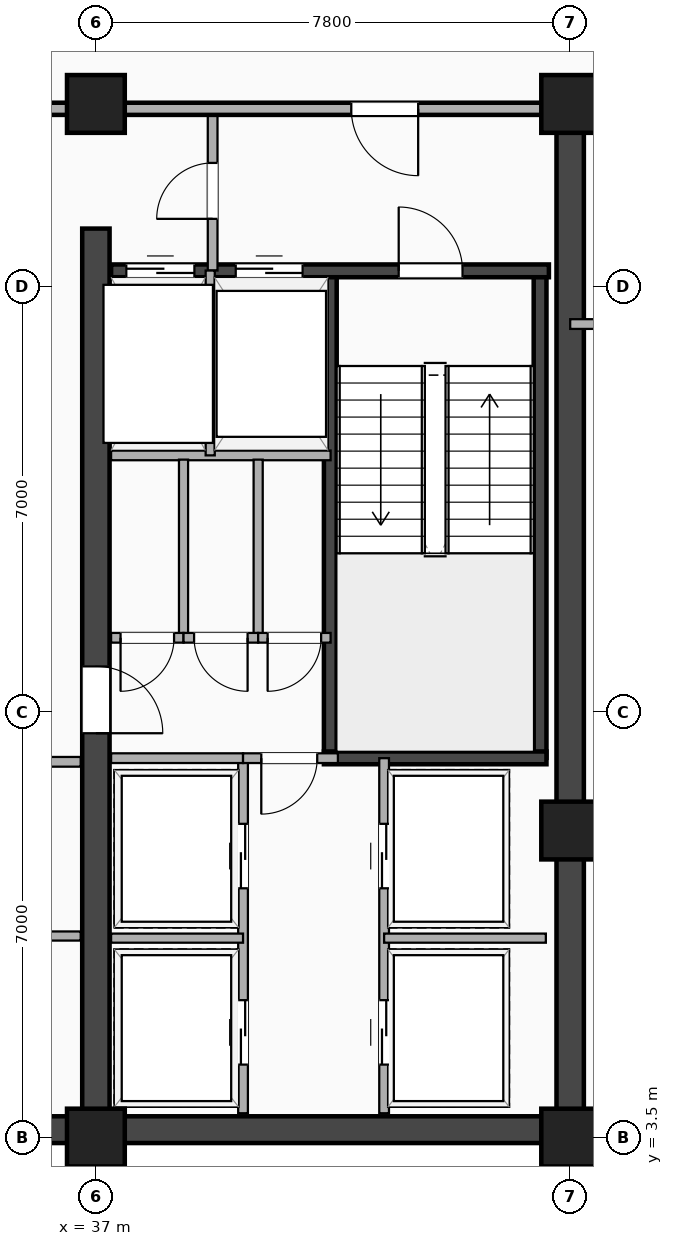
"""IFC4 building model, lengths in metres.
Left out: names, types, materials, properties, quantities, classifications, styles, units other than length and angle.
Written with IfcOpenShell. Run it as: python <this file> out.ifc"""

import sys

from ifc_helpers import new_model, si_unit, direction, frame, frame_2d, origin, origin_2d, place, context, subcontext, project, spatial, rectangle, extrude, element, fill, save


model = new_model("IFC4")
c1 = context("Model", 3, precision=1e-05, world=origin(), true_north=direction((0.0, 1.0)))
c2 = subcontext(c1, "Body", "Model", "MODEL_VIEW")
j1 = project(units=[si_unit("LENGTHUNIT", "METRE"), si_unit("PLANEANGLEUNIT", "RADIAN")], contexts=[c1])
p1 = place(None, origin())
s1 = spatial("IfcSite", under=j1, at=p1, CompositionType="ELEMENT")
p2 = place(p1, origin())
s2 = spatial("IfcBuilding", under=s1, at=p2, CompositionType="ELEMENT")
p3 = place(p2, frame((0.0, 0.0, 192.5)))
s3 = spatial("IfcBuildingStorey", under=s2, at=p3, CompositionType="ELEMENT", Elevation=192.5)
p4 = place(p3, frame((20.3, 3.63, 0.0), z_axis=(0.0, 0.0, 1.0), x_axis=(1.0, 0.0, 0.0)))
e1 = element("IfcWall", 1, at=p4, inside=s3, PredefinedType="SHEAR", context=c2, shape_type="SweptSolid", body=[
    extrude(rectangle(XDim=24.5, YDim=0.44, at=frame_2d((12.25, 0.0))), origin(), (0.0, 0.0, 1.0), 4.16),
])
p5 = place(p3, frame((44.8, 3.5, 0.0), z_axis=(0.0, 0.0, 1.0), x_axis=(0.0, 1.0, 0.0)))
e2 = element("IfcWall", 2, at=p5, inside=s3, PredefinedType="SHEAR", context=c2, shape_type="SweptSolid", body=[
    extrude(rectangle(XDim=16.9, YDim=0.45, at=frame_2d((8.45, 0.0))), origin(), (0.0, 0.0, 1.0), 4.16),
])
p6 = place(p3, frame((37.0, 3.5, 0.0), z_axis=(0.0, 0.0, 1.0), x_axis=(0.0, 1.0, 0.0)))
e3 = element("IfcWall", 3, at=p6, inside=s3, PredefinedType="SHEAR", context=c2, shape_type="SweptSolid", body=[
    extrude(rectangle(XDim=14.95, YDim=0.45, at=frame_2d((7.475, 0.0))), origin(), (0.0, 0.0, 1.0), 4.16),
])
p7 = place(p6, frame((6.65, 0.0, 0.0)))
e4 = element("IfcOpeningElement", 4, at=p7, cuts=e3, PredefinedType="OPENING", context=c2, shape_type="SweptSolid", body=[
    extrude(rectangle(XDim=1.1, YDim=2.15, at=frame_2d((0.55, 1.075))), frame((0.0, 0.235, 0.0), z_axis=(0.0, -1.0, 0.0), x_axis=(1.0, 0.0, 0.0)), (0.0, 0.0, 1.0), 0.47),
])
for number, where, z_axis, x_axis in (
    (5, (40.855, 9.745, 0.0), (0.0, 0.0, 1.0), (0.0, 1.0, 0.0)),
    (6, (44.305, 9.745, 0.0), (0.0, 0.0, 1.0), (0.0, 1.0, 0.0)),
):
    element("IfcWall", number, at=place(p3, frame(where, z_axis=z_axis, x_axis=x_axis)), inside=s3, PredefinedType="SHEAR", context=c2, shape_type="SweptSolid", body=[
        extrude(rectangle(XDim=8.01, YDim=0.21, at=frame_2d((4.005, 0.0))), origin(), (0.0, 0.0, 1.0), 4.16),
    ])
p8 = place(p3, frame((40.75, 9.745, 0.0), z_axis=(0.0, 0.0, 1.0), x_axis=(1.0, 0.0, 0.0)))
e7 = element("IfcWall", 7, at=p8, inside=s3, PredefinedType="SHEAR", context=c2, shape_type="SweptSolid", body=[
    extrude(rectangle(XDim=3.66, YDim=0.21, at=frame_2d((1.83, 0.0))), origin(), (0.0, 0.0, 1.0), 4.16),
])
p9 = place(p3, frame((37.25, 17.755, 0.0), z_axis=(0.0, 0.0, 1.0), x_axis=(1.0, 0.0, 0.0)))
e8 = element("IfcWall", 8, at=p9, inside=s3, PredefinedType="SHEAR", context=c2, shape_type="SweptSolid", body=[
    extrude(rectangle(XDim=7.2, YDim=0.21, at=frame_2d((3.6, 0.0))), origin(), (0.0, 0.0, 1.0), 4.16),
])
p10 = place(p9, frame((0.25, 0.0, 0.0)))
e9 = element("IfcOpeningElement", 9, at=p10, cuts=e8, PredefinedType="OPENING", context=c2, shape_type="SweptSolid", body=[
    extrude(rectangle(XDim=1.12, YDim=2.2, at=frame_2d((0.56, 1.1))), frame((0.0, 0.115, 0.0), z_axis=(0.0, -1.0, 0.0), x_axis=(1.0, 0.0, 0.0)), (0.0, 0.0, 1.0), 0.23),
])
p11 = place(p9, frame((2.05, 0.0, 0.0)))
e10 = element("IfcOpeningElement", 10, at=p11, cuts=e8, PredefinedType="OPENING", context=c2, shape_type="SweptSolid", body=[
    extrude(rectangle(XDim=1.1, YDim=2.18, at=frame_2d((0.55, 1.09))), frame((0.0, 0.115, 0.0), z_axis=(0.0, -1.0, 0.0), x_axis=(1.0, 0.0, 0.0)), (0.0, 0.0, 1.0), 0.23),
])
p12 = place(p9, frame((5.78, 0.0, 0.0), z_axis=(0.0, 0.0, 1.0), x_axis=(-1.0, 0.0, 0.0)))
e11 = element("IfcOpeningElement", 11, at=p12, cuts=e8, PredefinedType="OPENING", context=c2, shape_type="SweptSolid", body=[
    extrude(rectangle(XDim=1.05, YDim=2.15, at=frame_2d((0.525, 1.075))), frame((0.0, 0.115, 0.0), z_axis=(0.0, -1.0, 0.0), x_axis=(1.0, 0.0, 0.0)), (0.0, 0.0, 1.0), 0.23),
])
for number, where, z_axis, x_axis in (
    (12, (37.0, 3.5, -0.24), (0.0, 0.0, 1.0), (1.0, 0.0, 0.0)),
    (13, (44.8, 3.5, -0.24), (0.0, 0.0, 1.0), (1.0, 0.0, 0.0)),
    (14, (44.8, 8.55, -0.24), (0.0, 0.0, 1.0), (1.0, 0.0, 0.0)),
    (15, (37.0, 20.5, -0.24), (0.0, 0.0, 1.0), (1.0, 0.0, 0.0)),
    (16, (44.8, 20.5, -0.24), (0.0, 0.0, 1.0), (1.0, 0.0, 0.0)),
):
    element("IfcColumn", number, at=place(p3, frame(where, z_axis=z_axis, x_axis=x_axis)), inside=s3, PredefinedType="COLUMN", context=c2, shape_type="SweptSolid", body=[
        extrude(rectangle(XDim=0.95, YDim=0.95, at=origin_2d()), origin(), (0.0, 0.0, 1.0), 4.4),
    ])
p13 = place(p3, frame((38.92, 17.76, 0.0), z_axis=(0.0, 0.0, 1.0), x_axis=(0.0, 1.0, 0.0)))
e17 = element("IfcWall", 17, at=p13, inside=s3, PredefinedType="PARTITIONING", context=c2, shape_type="SweptSolid", body=[
    extrude(rectangle(XDim=2.66, YDim=0.16, at=frame_2d((1.33, 0.0))), origin(), (0.0, 0.0, 1.0), 3.606),
])
p14 = place(p13, frame((1.77, 0.0, 0.0), z_axis=(0.0, 0.0, 1.0), x_axis=(-1.0, 0.0, 0.0)))
e18 = element("IfcOpeningElement", 18, at=p14, cuts=e17, PredefinedType="OPENING", context=c2, shape_type="SweptSolid", body=[
    extrude(rectangle(XDim=0.92, YDim=2.08, at=frame_2d((0.46, 1.04))), frame((0.0, 0.09, 0.0), z_axis=(0.0, -1.0, 0.0), x_axis=(1.0, 0.0, 0.0)), (0.0, 0.0, 1.0), 0.18),
])
p15 = place(p3, frame((37.25, 14.72, 0.0), z_axis=(0.0, 0.0, 1.0), x_axis=(1.0, 0.0, 0.0)))
e19 = element("IfcWall", 19, at=p15, inside=s3, PredefinedType="PARTITIONING", context=c2, shape_type="SweptSolid", body=[
    extrude(rectangle(XDim=3.61, YDim=0.16, at=frame_2d((1.805, 0.0))), origin(), (0.0, 0.0, 1.0), 4.16),
])
p16 = place(p3, frame((38.88, 14.72, 0.0), z_axis=(0.0, 0.0, 1.0), x_axis=(0.0, 1.0, 0.0)))
e20 = element("IfcWall", 20, at=p16, inside=s3, PredefinedType="PARTITIONING", context=c2, shape_type="SweptSolid", body=[
    extrude(rectangle(XDim=3.04, YDim=0.15, at=frame_2d((1.52, 0.0))), origin(), (0.0, 0.0, 1.0), 4.16),
])
p17 = place(p3, frame((29.2, 20.42, 0.0), z_axis=(0.0, 0.0, 1.0), x_axis=(1.0, 0.0, 0.0)))
e21 = element("IfcWall", 21, at=p17, inside=s3, PredefinedType="PARTITIONING", context=c2, shape_type="SweptSolid", body=[
    extrude(rectangle(XDim=7.8, YDim=0.2, at=frame_2d((3.9, 0.0))), origin(), (0.0, 0.0, 1.0), 3.372),
])
p18 = place(p17, frame((3.409, 0.0, 0.0)))
e22 = element("IfcOpeningElement", 22, at=p18, cuts=e21, PredefinedType="OPENING", context=c2, shape_type="SweptSolid", body=[
    extrude(rectangle(XDim=1.1, YDim=2.15, at=frame_2d((0.55, 1.075))), frame((0.0, 0.11, 0.0), z_axis=(0.0, -1.0, 0.0), x_axis=(1.0, 0.0, 0.0)), (0.0, 0.0, 1.0), 0.22),
])
p19 = place(p3, frame((37.0, 20.42, 0.0), z_axis=(0.0, 0.0, 1.0), x_axis=(1.0, 0.0, 0.0)))
e23 = element("IfcWall", 23, at=p19, inside=s3, PredefinedType="PARTITIONING", context=c2, shape_type="SweptSolid", body=[
    extrude(rectangle(XDim=7.45, YDim=0.2, at=frame_2d((3.725, 0.0))), origin(), (0.0, 0.0, 1.0), 3.372),
])
p20 = place(p19, frame((4.2, 0.0, 0.0)))
e24 = element("IfcOpeningElement", 24, at=p20, cuts=e23, PredefinedType="OPENING", context=c2, shape_type="SweptSolid", body=[
    extrude(rectangle(XDim=1.1, YDim=2.15, at=frame_2d((0.55, 1.075))), frame((0.0, 0.11, 0.0), z_axis=(0.0, -1.0, 0.0), x_axis=(1.0, 0.0, 0.0)), (0.0, 0.0, 1.0), 0.22),
])
p21 = place(p3, frame((38.441, 11.72, 0.0), z_axis=(0.0, 0.0, 1.0), x_axis=(0.0, 1.0, 0.0)))
e25 = element("IfcWall", 25, at=p21, inside=s3, PredefinedType="PARTITIONING", context=c2, shape_type="SweptSolid", body=[
    extrude(rectangle(XDim=2.93, YDim=0.15, at=frame_2d((1.465, 0.0))), origin(), (0.0, 0.0, 1.0), 4.16),
])
p22 = place(p3, frame((37.25, 11.72, 0.0), z_axis=(0.0, 0.0, 1.0), x_axis=(1.0, 0.0, 0.0)))
e26 = element("IfcWall", 26, at=p22, inside=s3, PredefinedType="PARTITIONING", context=c2, shape_type="SweptSolid", body=[
    extrude(rectangle(XDim=1.191, YDim=0.16, at=frame_2d((0.596, 0.0))), origin(), (0.0, 0.0, 1.0), 4.16),
])
p23 = place(p22, frame((0.156, 0.0, 0.0)))
e27 = element("IfcOpeningElement", 27, at=p23, cuts=e26, PredefinedType="OPENING", context=c2, shape_type="SweptSolid", body=[
    extrude(rectangle(XDim=0.88, YDim=2.08, at=frame_2d((0.44, 1.04))), frame((0.0, 0.09, 0.0), z_axis=(0.0, -1.0, 0.0), x_axis=(1.0, 0.0, 0.0)), (0.0, 0.0, 1.0), 0.18),
])
p24 = place(p3, frame((39.669, 11.72, 0.0), z_axis=(0.0, 0.0, 1.0), x_axis=(0.0, 1.0, 0.0)))
e28 = element("IfcWall", 28, at=p24, inside=s3, PredefinedType="PARTITIONING", context=c2, shape_type="SweptSolid", body=[
    extrude(rectangle(XDim=2.93, YDim=0.15, at=frame_2d((1.465, 0.0))), origin(), (0.0, 0.0, 1.0), 4.16),
])
p25 = place(p3, frame((38.441, 11.72, 0.0), z_axis=(0.0, 0.0, 1.0), x_axis=(1.0, 0.0, 0.0)))
e29 = element("IfcWall", 29, at=p25, inside=s3, PredefinedType="PARTITIONING", context=c2, shape_type="SweptSolid", body=[
    extrude(rectangle(XDim=1.227, YDim=0.16, at=frame_2d((0.614, 0.0))), origin(), (0.0, 0.0, 1.0), 4.16),
])
p26 = place(p25, frame((0.174, 0.0, 0.0)))
e30 = element("IfcOpeningElement", 30, at=p26, cuts=e29, PredefinedType="OPENING", context=c2, shape_type="SweptSolid", body=[
    extrude(rectangle(XDim=0.88, YDim=2.08, at=frame_2d((0.44, 1.04))), frame((0.0, 0.09, 0.0), z_axis=(0.0, -1.0, 0.0), x_axis=(1.0, 0.0, 0.0)), (0.0, 0.0, 1.0), 0.18),
])
p27 = place(p3, frame((39.669, 11.72, 0.0), z_axis=(0.0, 0.0, 1.0), x_axis=(1.0, 0.0, 0.0)))
e31 = element("IfcWall", 31, at=p27, inside=s3, PredefinedType="PARTITIONING", context=c2, shape_type="SweptSolid", body=[
    extrude(rectangle(XDim=1.191, YDim=0.16, at=frame_2d((0.596, 0.0))), origin(), (0.0, 0.0, 1.0), 4.16),
])
p28 = place(p27, frame((0.156, 0.0, 0.0)))
e32 = element("IfcOpeningElement", 32, at=p28, cuts=e31, PredefinedType="OPENING", context=c2, shape_type="SweptSolid", body=[
    extrude(rectangle(XDim=0.88, YDim=2.08, at=frame_2d((0.44, 1.04))), frame((0.0, 0.09, 0.0), z_axis=(0.0, -1.0, 0.0), x_axis=(1.0, 0.0, 0.0)), (0.0, 0.0, 1.0), 0.18),
])
p29 = place(p3, frame((39.42, 3.9, 0.0), z_axis=(0.0, 0.0, 1.0), x_axis=(0.0, 1.0, 0.0)))
e33 = element("IfcWall", 33, at=p29, inside=s3, PredefinedType="PARTITIONING", context=c2, shape_type="SweptSolid", body=[
    extrude(rectangle(XDim=5.84, YDim=0.16, at=frame_2d((2.92, 0.0))), origin(), (0.0, 0.0, 1.0), 4.16),
])
p30 = place(p29, frame((1.86, 0.0, 0.0), z_axis=(0.0, 0.0, 1.0), x_axis=(-1.0, 0.0, 0.0)))
e34 = element("IfcOpeningElement", 34, at=p30, cuts=e33, PredefinedType="OPENING", context=c2, shape_type="SweptSolid", body=[
    extrude(rectangle(XDim=1.06, YDim=2.16, at=frame_2d((0.53, 1.08))), frame((0.0, 0.09, 0.0), z_axis=(0.0, -1.0, 0.0), x_axis=(1.0, 0.0, 0.0)), (0.0, 0.0, 1.0), 0.18),
])
p31 = place(p29, frame((4.76, 0.0, 0.0), z_axis=(0.0, 0.0, 1.0), x_axis=(-1.0, 0.0, 0.0)))
e35 = element("IfcOpeningElement", 35, at=p31, cuts=e33, PredefinedType="OPENING", context=c2, shape_type="SweptSolid", body=[
    extrude(rectangle(XDim=1.06, YDim=2.16, at=frame_2d((0.53, 1.08))), frame((0.0, 0.09, 0.0), z_axis=(0.0, -1.0, 0.0), x_axis=(1.0, 0.0, 0.0)), (0.0, 0.0, 1.0), 0.18),
])
p32 = place(p3, frame((41.74, 3.9, 0.0), z_axis=(0.0, 0.0, 1.0), x_axis=(0.0, 1.0, 0.0)))
e36 = element("IfcWall", 36, at=p32, inside=s3, PredefinedType="PARTITIONING", context=c2, shape_type="SweptSolid", body=[
    extrude(rectangle(XDim=5.84, YDim=0.16, at=frame_2d((2.92, 0.0))), origin(), (0.0, 0.0, 1.0), 4.16),
])
p33 = place(p32, frame((0.8, 0.0, 0.0)))
e37 = element("IfcOpeningElement", 37, at=p33, cuts=e36, PredefinedType="OPENING", context=c2, shape_type="SweptSolid", body=[
    extrude(rectangle(XDim=1.06, YDim=2.16, at=frame_2d((0.53, 1.08))), frame((0.0, 0.09, 0.0), z_axis=(0.0, -1.0, 0.0), x_axis=(1.0, 0.0, 0.0)), (0.0, 0.0, 1.0), 0.18),
])
p34 = place(p32, frame((3.7, 0.0, 0.0)))
e38 = element("IfcOpeningElement", 38, at=p34, cuts=e36, PredefinedType="OPENING", context=c2, shape_type="SweptSolid", body=[
    extrude(rectangle(XDim=1.06, YDim=2.16, at=frame_2d((0.53, 1.08))), frame((0.0, 0.09, 0.0), z_axis=(0.0, -1.0, 0.0), x_axis=(1.0, 0.0, 0.0)), (0.0, 0.0, 1.0), 0.18),
])
p35 = place(p3, frame((37.25, 6.78, 0.0), z_axis=(0.0, 0.0, 1.0), x_axis=(1.0, 0.0, 0.0)))
e39 = element("IfcWall", 39, at=p35, inside=s3, PredefinedType="PARTITIONING", context=c2, shape_type="SweptSolid", body=[
    extrude(rectangle(XDim=2.17, YDim=0.15, at=frame_2d((1.085, 0.0))), origin(), (0.0, 0.0, 1.0), 4.16),
])
p36 = place(p3, frame((41.74, 6.78, 0.0), z_axis=(0.0, 0.0, 1.0), x_axis=(1.0, 0.0, 0.0)))
e40 = element("IfcWall", 40, at=p36, inside=s3, PredefinedType="PARTITIONING", context=c2, shape_type="SweptSolid", body=[
    extrude(rectangle(XDim=2.66, YDim=0.15, at=frame_2d((1.33, 0.0))), origin(), (0.0, 0.0, 1.0), 3.372),
])
p37 = place(p3, frame((37.25, 9.74, 0.0), z_axis=(0.0, 0.0, 1.0), x_axis=(1.0, 0.0, 0.0)))
e41 = element("IfcWall", 41, at=p37, inside=s3, PredefinedType="PARTITIONING", context=c2, shape_type="SweptSolid", body=[
    extrude(rectangle(XDim=2.17, YDim=0.16, at=frame_2d((1.085, 0.0))), origin(), (0.0, 0.0, 1.0), 4.16),
])
p38 = place(p3, frame((39.42, 9.74, 0.0), z_axis=(0.0, 0.0, 1.0), x_axis=(1.0, 0.0, 0.0)))
e42 = element("IfcWall", 42, at=p38, inside=s3, PredefinedType="PARTITIONING", context=c2, shape_type="SweptSolid", body=[
    extrude(rectangle(XDim=1.56, YDim=0.16, at=frame_2d((0.78, 0.0))), origin(), (0.0, 0.0, 1.0), 4.16),
])
p39 = place(p38, frame((0.3, 0.0, 0.0)))
e43 = element("IfcOpeningElement", 43, at=p39, cuts=e42, PredefinedType="OPENING", context=c2, shape_type="SweptSolid", body=[
    extrude(rectangle(XDim=0.92, YDim=2.08, at=frame_2d((0.46, 1.04))), frame((0.0, 0.09, 0.0), z_axis=(0.0, -1.0, 0.0), x_axis=(1.0, 0.0, 0.0)), (0.0, 0.0, 1.0), 0.18),
])
p40 = place(p3, frame((29.45, 9.68, 0.0), z_axis=(0.0, 0.0, 1.0), x_axis=(1.0, 0.0, 0.0)))
e44 = element("IfcWall", 44, at=p40, inside=s3, PredefinedType="PARTITIONING", context=c2, shape_type="SweptSolid", body=[
    extrude(rectangle(XDim=7.3, YDim=0.16, at=frame_2d((3.65, 0.0))), origin(), (0.0, 0.0, 1.0), 4.16),
])
p41 = place(p40, frame((4.11, 0.0, 0.0), z_axis=(0.0, 0.0, 1.0), x_axis=(-1.0, 0.0, 0.0)))
e45 = element("IfcOpeningElement", 45, at=p41, cuts=e44, PredefinedType="OPENING", context=c2, shape_type="SweptSolid", body=[
    extrude(rectangle(XDim=0.92, YDim=2.08, at=frame_2d((0.46, 1.04))), frame((0.0, 0.09, 0.0), z_axis=(0.0, -1.0, 0.0), x_axis=(1.0, 0.0, 0.0)), (0.0, 0.0, 1.0), 0.18),
])
p42 = place(p3, frame((29.45, 6.815, 0.0), z_axis=(0.0, 0.0, 1.0), x_axis=(1.0, 0.0, 0.0)))
e46 = element("IfcWall", 46, at=p42, inside=s3, PredefinedType="PARTITIONING", context=c2, shape_type="SweptSolid", body=[
    extrude(rectangle(XDim=7.3, YDim=0.15, at=frame_2d((3.65, 0.0))), origin(), (0.0, 0.0, 1.0), 4.16),
])
p43 = place(p42, frame((4.09, 0.0, 0.0), z_axis=(0.0, 0.0, 1.0), x_axis=(-1.0, 0.0, 0.0)))
e47 = element("IfcOpeningElement", 47, at=p43, cuts=e46, PredefinedType="OPENING", context=c2, shape_type="SweptSolid", body=[
    extrude(rectangle(XDim=0.88, YDim=2.08, at=frame_2d((0.44, 1.04))), frame((0.0, 0.085, 0.0), z_axis=(0.0, -1.0, 0.0), x_axis=(1.0, 0.0, 0.0)), (0.0, 0.0, 1.0), 0.17),
])
p44 = place(p3, frame((44.8, 16.88, 0.0), z_axis=(0.0, 0.0, 1.0), x_axis=(1.0, 0.0, 0.0)))
e48 = element("IfcWall", 48, at=p44, inside=s3, PredefinedType="PARTITIONING", context=c2, shape_type="SweptSolid", body=[
    extrude(rectangle(XDim=2.15, YDim=0.16, at=frame_2d((1.075, 0.0))), origin(), (0.0, 0.0, 1.0), 3.372),
])
p45 = place(p44, frame((1.53, 0.0, 0.0), z_axis=(0.0, 0.0, 1.0), x_axis=(-1.0, 0.0, 0.0)))
e49 = element("IfcOpeningElement", 49, at=p45, cuts=e48, PredefinedType="OPENING", context=c2, shape_type="SweptSolid", body=[
    extrude(rectangle(XDim=0.88, YDim=2.08, at=frame_2d((0.44, 1.04))), frame((0.0, 0.09, 0.0), z_axis=(0.0, -1.0, 0.0), x_axis=(1.0, 0.0, 0.0)), (0.0, 0.0, 1.0), 0.18),
])
p46 = place(p10, origin())
e50 = element("IfcDoor", 50, at=p46, inside=s3, OperationType="DOUBLE_DOOR_SLIDING", PredefinedType="DOOR", context=c2, shape_type="SweptSolid", body=[
    extrude(rectangle(XDim=1.12, YDim=2.2, at=frame_2d((0.56, 1.1))), frame((0.0, 0.025, 0.0), z_axis=(0.0, -1.0, 0.0), x_axis=(1.0, 0.0, 0.0)), (0.0, 0.0, 1.0), 0.05),
])
fill(e9, e50)
p47 = place(p11, origin())
e51 = element("IfcDoor", 51, at=p47, inside=s3, OperationType="DOUBLE_DOOR_SLIDING", PredefinedType="DOOR", context=c2, shape_type="SweptSolid", body=[
    extrude(rectangle(XDim=1.1, YDim=2.18, at=frame_2d((0.55, 1.09))), frame((0.0, 0.025, 0.0), z_axis=(0.0, -1.0, 0.0), x_axis=(1.0, 0.0, 0.0)), (0.0, 0.0, 1.0), 0.05),
])
fill(e10, e51)
p48 = place(p12, origin())
e52 = element("IfcDoor", 52, at=p48, inside=s3, OperationType="SINGLE_SWING_LEFT", PredefinedType="DOOR", context=c2, shape_type="SweptSolid", body=[
    extrude(rectangle(XDim=1.05, YDim=2.15, at=frame_2d((0.525, 1.075))), frame((0.0, 0.025, 0.0), z_axis=(0.0, -1.0, 0.0), x_axis=(1.0, 0.0, 0.0)), (0.0, 0.0, 1.0), 0.05),
])
fill(e11, e52)
p49 = place(p7, origin())
e53 = element("IfcDoor", 53, at=p49, inside=s3, OperationType="SINGLE_SWING_LEFT", PredefinedType="DOOR", context=c2, shape_type="SweptSolid", body=[
    extrude(rectangle(XDim=1.1, YDim=2.15, at=frame_2d((0.55, 1.075))), frame((0.0, 0.025, 0.0), z_axis=(0.0, -1.0, 0.0), x_axis=(1.0, 0.0, 0.0)), (0.0, 0.0, 1.0), 0.05),
])
fill(e4, e53)
p50 = place(p14, origin())
e54 = element("IfcDoor", 54, at=p50, inside=s3, OperationType="SINGLE_SWING_LEFT", PredefinedType="DOOR", context=c2, shape_type="SweptSolid", body=[
    extrude(rectangle(XDim=0.92, YDim=2.08, at=frame_2d((0.46, 1.04))), frame((0.0, 0.025, 0.0), z_axis=(0.0, -1.0, 0.0), x_axis=(1.0, 0.0, 0.0)), (0.0, 0.0, 1.0), 0.05),
])
fill(e18, e54)
p51 = place(p20, origin())
e55 = element("IfcDoor", 55, at=p51, inside=s3, OperationType="SINGLE_SWING_RIGHT", PredefinedType="DOOR", context=c2, shape_type="SweptSolid", body=[
    extrude(rectangle(XDim=1.1, YDim=2.15, at=frame_2d((0.55, 1.075))), frame((0.0, 0.025, 0.0), z_axis=(0.0, -1.0, 0.0), x_axis=(1.0, 0.0, 0.0)), (0.0, 0.0, 1.0), 0.05),
])
fill(e24, e55)
p52 = place(p23, origin())
e56 = element("IfcDoor", 56, at=p52, inside=s3, OperationType="SINGLE_SWING_LEFT", PredefinedType="DOOR", context=c2, shape_type="SweptSolid", body=[
    extrude(rectangle(XDim=0.88, YDim=2.08, at=frame_2d((0.44, 1.04))), frame((0.0, 0.025, 0.0), z_axis=(0.0, -1.0, 0.0), x_axis=(1.0, 0.0, 0.0)), (0.0, 0.0, 1.0), 0.05),
])
fill(e27, e56)
p53 = place(p26, origin())
e57 = element("IfcDoor", 57, at=p53, inside=s3, OperationType="SINGLE_SWING_RIGHT", PredefinedType="DOOR", context=c2, shape_type="SweptSolid", body=[
    extrude(rectangle(XDim=0.88, YDim=2.08, at=frame_2d((0.44, 1.04))), frame((0.0, 0.025, 0.0), z_axis=(0.0, -1.0, 0.0), x_axis=(1.0, 0.0, 0.0)), (0.0, 0.0, 1.0), 0.05),
])
fill(e30, e57)
p54 = place(p28, origin())
e58 = element("IfcDoor", 58, at=p54, inside=s3, OperationType="SINGLE_SWING_LEFT", PredefinedType="DOOR", context=c2, shape_type="SweptSolid", body=[
    extrude(rectangle(XDim=0.88, YDim=2.08, at=frame_2d((0.44, 1.04))), frame((0.0, 0.025, 0.0), z_axis=(0.0, -1.0, 0.0), x_axis=(1.0, 0.0, 0.0)), (0.0, 0.0, 1.0), 0.05),
])
fill(e32, e58)
p55 = place(p30, origin())
e59 = element("IfcDoor", 59, at=p55, inside=s3, OperationType="DOUBLE_DOOR_SLIDING", PredefinedType="DOOR", context=c2, shape_type="SweptSolid", body=[
    extrude(rectangle(XDim=1.06, YDim=2.16, at=frame_2d((0.53, 1.08))), frame((0.0, 0.025, 0.0), z_axis=(0.0, -1.0, 0.0), x_axis=(1.0, 0.0, 0.0)), (0.0, 0.0, 1.0), 0.05),
])
fill(e34, e59)
p56 = place(p31, origin())
e60 = element("IfcDoor", 60, at=p56, inside=s3, OperationType="DOUBLE_DOOR_SLIDING", PredefinedType="DOOR", context=c2, shape_type="SweptSolid", body=[
    extrude(rectangle(XDim=1.06, YDim=2.16, at=frame_2d((0.53, 1.08))), frame((0.0, 0.025, 0.0), z_axis=(0.0, -1.0, 0.0), x_axis=(1.0, 0.0, 0.0)), (0.0, 0.0, 1.0), 0.05),
])
fill(e35, e60)
p57 = place(p33, origin())
e61 = element("IfcDoor", 61, at=p57, inside=s3, OperationType="DOUBLE_DOOR_SLIDING", PredefinedType="DOOR", context=c2, shape_type="SweptSolid", body=[
    extrude(rectangle(XDim=1.06, YDim=2.16, at=frame_2d((0.53, 1.08))), frame((0.0, 0.025, 0.0), z_axis=(0.0, -1.0, 0.0), x_axis=(1.0, 0.0, 0.0)), (0.0, 0.0, 1.0), 0.05),
])
fill(e37, e61)
p58 = place(p34, origin())
e62 = element("IfcDoor", 62, at=p58, inside=s3, OperationType="DOUBLE_DOOR_SLIDING", PredefinedType="DOOR", context=c2, shape_type="SweptSolid", body=[
    extrude(rectangle(XDim=1.06, YDim=2.16, at=frame_2d((0.53, 1.08))), frame((0.0, 0.025, 0.0), z_axis=(0.0, -1.0, 0.0), x_axis=(1.0, 0.0, 0.0)), (0.0, 0.0, 1.0), 0.05),
])
fill(e38, e62)
p59 = place(p39, origin())
e63 = element("IfcDoor", 63, at=p59, inside=s3, OperationType="SINGLE_SWING_LEFT", PredefinedType="DOOR", context=c2, shape_type="SweptSolid", body=[
    extrude(rectangle(XDim=0.92, YDim=2.08, at=frame_2d((0.46, 1.04))), frame((0.0, 0.025, 0.0), z_axis=(0.0, -1.0, 0.0), x_axis=(1.0, 0.0, 0.0)), (0.0, 0.0, 1.0), 0.05),
])
fill(e43, e63)
save(model, sys.argv[1])
